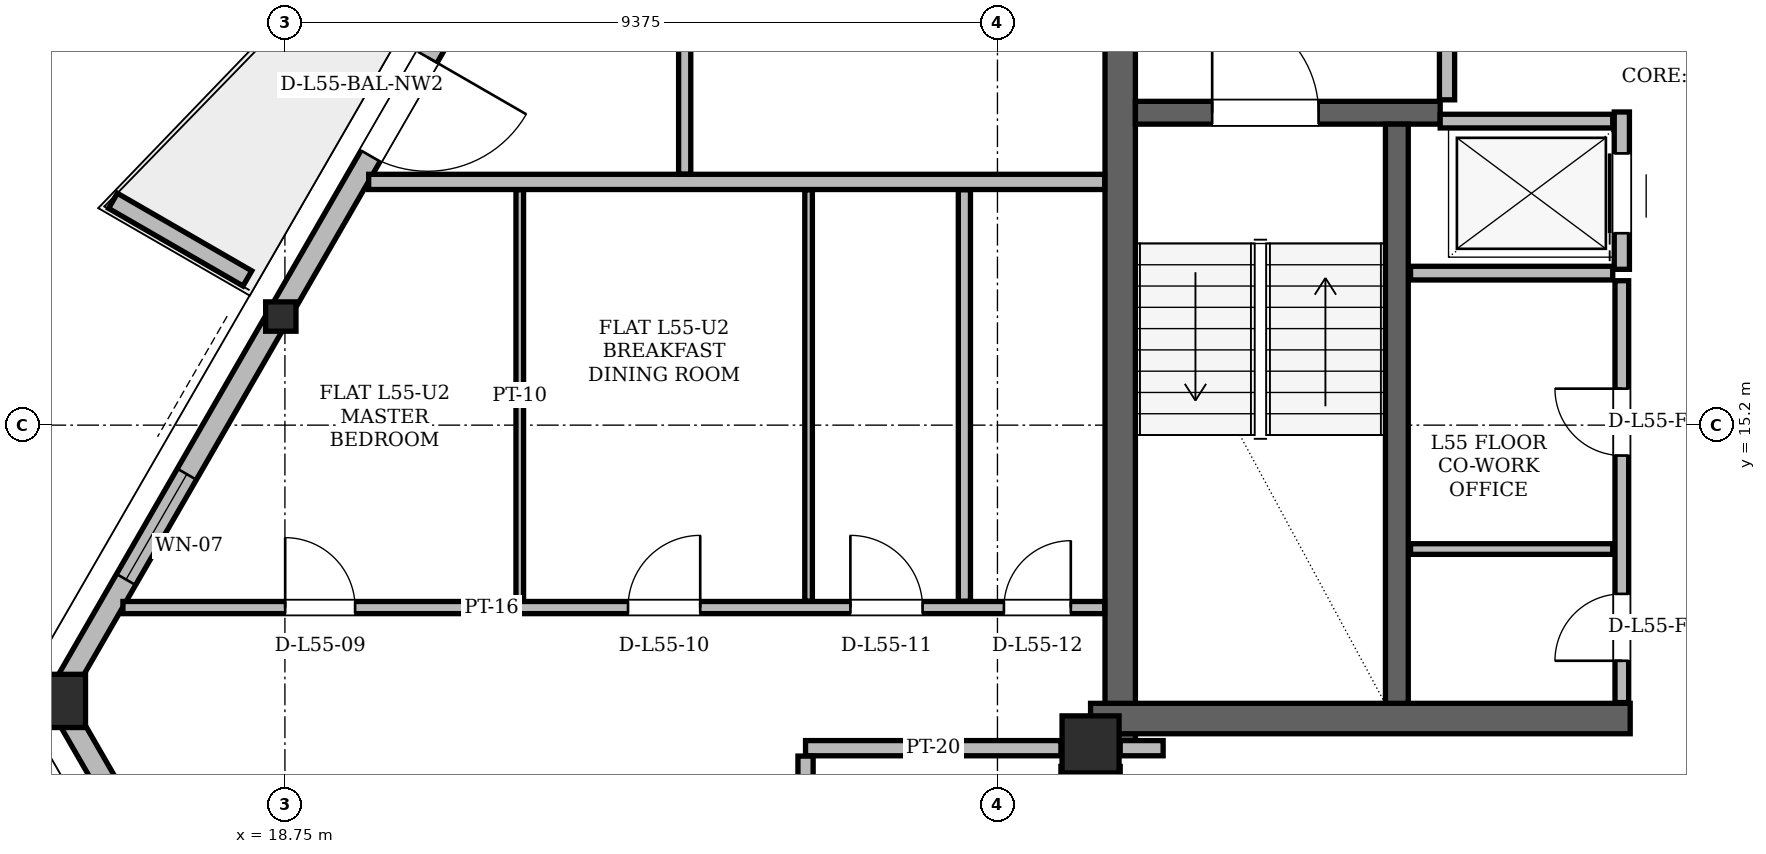
"""IFC4 building model, lengths in metres.
Left out: names, types, materials, properties, quantities, classifications, styles, units other than length and angle.
Written with IfcOpenShell. Run it as: python <this file> out.ifc"""

import sys

from ifc_helpers import new_model, si_unit, direction, frame, frame_2d, origin, origin_2d, place, context, subcontext, project, spatial, polyline, rectangle, hollow_rectangle, i_section, outline, extrude, element, fill, save


model = new_model("IFC4")
c1 = context("Model", 3, precision=1e-05, world=origin(), true_north=direction((0.0, 1.0)))
c2 = subcontext(c1, "Body", "Model", "MODEL_VIEW")
j1 = project(units=[si_unit("LENGTHUNIT", "METRE"), si_unit("PLANEANGLEUNIT", "RADIAN")], contexts=[c1])
p1 = place(None, origin())
s1 = spatial("IfcSite", under=j1, at=p1, CompositionType="ELEMENT")
p2 = place(p1, origin())
s2 = spatial("IfcBuilding", under=s1, at=p2, CompositionType="ELEMENT")
p3 = place(p2, frame((0.0, 0.0, 209.1)))
s3 = spatial("IfcBuildingStorey", under=s2, at=p3, CompositionType="ELEMENT", Elevation=209.1)
p4 = place(p3, frame((29.35, 11.0, 0.0), z_axis=(0.0, 0.0, 1.0), x_axis=(1.0, 0.0, 0.0)))
e1 = element("IfcColumn", 1, at=p4, inside=s3, PredefinedType="COLUMN", context=c2, shape_type="SweptSolid", body=[
    extrude(hollow_rectangle(XDim=0.75, YDim=0.75, WallThickness=0.06, at=origin_2d()), origin(), (0.0, 0.0, 1.0), 3.6),
])
p5 = place(p3, frame((15.754, 11.601, 0.004), z_axis=(0.012370810716, -0.016177214013, 0.999792608889), x_axis=(0.794357832977, 0.607450107571, 0.0)))
e2 = element("IfcColumn", 2, at=p5, inside=s3, PredefinedType="COLUMN", context=c2, shape_type="SweptSolid", body=[
    extrude(hollow_rectangle(XDim=0.7, YDim=0.7, WallThickness=0.055, at=origin_2d()), origin(), (0.0, 0.0, 1.0), 3.592),
])
p6 = place(p3, frame((18.672, 16.654, 0.004), z_axis=(0.01366248773, -0.014002350608, 0.99980861699), x_axis=(0.715739588462, 0.698367268354, 0.0)))
e3 = element("IfcColumn", 3, at=p6, inside=s3, PredefinedType="COLUMN", context=c2, shape_type="SweptSolid", body=[
    extrude(i_section(OverallWidth=0.399, OverallDepth=0.386, WebThickness=0.021, FlangeThickness=0.033, at=origin_2d()), origin(), (0.0, 0.0, 1.0), 3.592),
])
p7 = place(p3, frame((29.74, 11.0, 0.0), z_axis=(0.0, 0.0, 1.0), x_axis=(0.0, 1.0, 0.0)))
e4 = element("IfcWall", 4, at=p7, inside=s3, PredefinedType="SHEAR", context=c2, shape_type="SweptSolid", body=[
    extrude(rectangle(XDim=13.3, YDim=0.4, at=frame_2d((6.65, 0.0))), origin(), (0.0, 0.0, 1.0), 3.38),
])
p8 = place(p3, frame((29.35, 11.34, 0.0), z_axis=(0.0, 0.0, 1.0), x_axis=(1.0, 0.0, 0.0)))
e5 = element("IfcWall", 5, at=p8, inside=s3, PredefinedType="SHEAR", context=c2, shape_type="SweptSolid", body=[
    extrude(rectangle(XDim=7.1, YDim=0.4, at=frame_2d((3.55, 0.0))), origin(), (0.0, 0.0, 1.0), 3.38),
])
p9 = place(p3, frame((29.94, 19.31, 0.0), z_axis=(0.0, 0.0, 1.0), x_axis=(1.0, 0.0, 0.0)))
e6 = element("IfcWall", 6, at=p9, inside=s3, PredefinedType="SHEAR", context=c2, shape_type="SweptSolid", body=[
    extrude(rectangle(XDim=4.01, YDim=0.3, at=frame_2d((2.005, 0.0))), origin(), (0.0, 0.0, 1.0), 3.38),
])
p10 = place(p9, frame((1.01, 0.0, 0.0)))
e7 = element("IfcOpeningElement", 7, at=p10, cuts=e6, PredefinedType="OPENING", context=c2, shape_type="SweptSolid", body=[
    extrude(rectangle(XDim=1.4, YDim=2.2, at=frame_2d((0.7, 1.1))), frame((0.0, 0.15, 0.0), z_axis=(0.0, -1.0, 0.0), x_axis=(1.0, 0.0, 0.0)), (0.0, 0.0, 1.0), 0.3),
])
p11 = place(p3, frame((33.38, 11.54, 0.0), z_axis=(0.0, 0.0, 1.0), x_axis=(0.0, 1.0, 0.0)))
e8 = element("IfcWall", 8, at=p11, inside=s3, PredefinedType="SHEAR", context=c2, shape_type="SweptSolid", body=[
    extrude(rectangle(XDim=7.62, YDim=0.3, at=frame_2d((3.81, 0.0))), origin(), (0.0, 0.0, 1.0), 3.38),
])
p12 = place(p3, frame((15.754, 11.601, 0.0), z_axis=(0.0, 0.0, 1.0), x_axis=(0.500015274395, -0.866016584929, 0.0)))
e9 = element("IfcWall", 9, at=p12, inside=s3, PredefinedType="SOLIDWALL", context=c2, shape_type="SweptSolid", body=[
    extrude(rectangle(XDim=7.025, YDim=0.29, at=frame_2d((3.512, 0.0))), origin(), (0.0, 0.0, 1.0), 2.677),
])
p13 = place(p3, frame((33.988, 43.182, 0.0), z_axis=(0.0, 0.0, 1.0), x_axis=(-0.50000139879, -0.866024596191, 0.0)))
e10 = element("IfcWall", 10, at=p13, inside=s3, PredefinedType="SOLIDWALL", context=c2, shape_type="SweptSolid", body=[
    extrude(rectangle(XDim=36.467, YDim=0.29, at=frame_2d((18.233, 0.0))), origin(), (0.0, 0.0, 1.0), 2.677),
])
p14 = place(p13, frame((3.429, 0.0, 0.0)))
e11 = element("IfcOpeningElement", 11, at=p14, cuts=e10, PredefinedType="OPENING", context=c2, shape_type="SweptSolid", body=[
    extrude(rectangle(XDim=1.5, YDim=2.2, at=frame_2d((0.75, 1.1))), frame((0.0, 0.145, 0.0), z_axis=(0.0, -1.0, 0.0), x_axis=(1.0, 0.0, 0.0)), (0.0, 0.0, 1.0), 0.29),
])
p15 = place(p13, frame((26.722, 0.0, 0.0)))
e12 = element("IfcOpeningElement", 12, at=p15, cuts=e10, PredefinedType="OPENING", context=c2, shape_type="SweptSolid", body=[
    extrude(rectangle(XDim=1.5, YDim=2.2, at=frame_2d((0.75, 1.1))), frame((0.0, 0.145, 0.0), z_axis=(0.0, -1.0, 0.0), x_axis=(1.0, 0.0, 0.0)), (0.0, 0.0, 1.0), 0.29),
])
p16 = place(p13, frame((33.056, 0.0, 0.85)))
e13 = element("IfcOpeningElement", 13, at=p16, cuts=e10, PredefinedType="OPENING", context=c2, shape_type="SweptSolid", body=[
    extrude(rectangle(XDim=1.6, YDim=1.7, at=frame_2d((0.8, 0.85))), frame((0.0, 0.145, 0.0), z_axis=(0.0, -1.0, 0.0), x_axis=(1.0, 0.0, 0.0)), (0.0, 0.0, 1.0), 0.29),
])
p17 = place(p13, frame((22.736, 0.0, 0.85)))
e14 = element("IfcOpeningElement", 14, at=p17, cuts=e10, PredefinedType="OPENING", context=c2, shape_type="SweptSolid", body=[
    extrude(rectangle(XDim=1.2, YDim=1.48, at=frame_2d((0.6, 0.74))), frame((0.0, 0.145, 0.0), z_axis=(0.0, -1.0, 0.0), x_axis=(1.0, 0.0, 0.0)), (0.0, 0.0, 1.0), 0.29),
])
p18 = place(p3, frame((18.256, 17.13, 0.0), z_axis=(0.0, 0.0, 1.0), x_axis=(-0.866012356593, 0.500022597718, 0.0)))
e15 = element("IfcWall", 15, at=p18, inside=s3, PredefinedType="PARAPET", context=c2, shape_type="SweptSolid", body=[
    extrude(outline(polyline([(0.0, 0.0), (2.042, 0.0), (2.042, 1.1), (0.0, 1.32), (0.0, 0.0)])), frame((0.0, 0.115, 0.0), z_axis=(0.0, -1.0, 0.0), x_axis=(1.0, 0.0, 0.0)), (0.0, 0.0, 1.0), 0.23),
])
p19 = place(p3, frame((34.04, 19.48, 0.0), z_axis=(0.0, 0.0, 1.0), x_axis=(0.0, 1.0, 0.0)))
e16 = element("IfcWall", 16, at=p19, inside=s3, PredefinedType="PARTITIONING", context=c2, shape_type="SweptSolid", body=[
    extrude(rectangle(XDim=4.5, YDim=0.2, at=frame_2d((2.25, 0.0))), origin(), (0.0, 0.0, 1.0), 3.38),
])
p20 = place(p19, frame((2.12, 0.0, 0.0)))
e17 = element("IfcOpeningElement", 17, at=p20, cuts=e16, PredefinedType="OPENING", context=c2, shape_type="SweptSolid", body=[
    extrude(rectangle(XDim=1.1, YDim=2.2, at=frame_2d((0.55, 1.1))), frame((0.0, 0.1, 0.0), z_axis=(0.0, -1.0, 0.0), x_axis=(1.0, 0.0, 0.0)), (0.0, 0.0, 1.0), 0.2),
])
p21 = place(p3, frame((36.34, 17.25, 0.0), z_axis=(0.0, 0.0, 1.0), x_axis=(0.0, 1.0, 0.0)))
e18 = element("IfcWall", 18, at=p21, inside=s3, PredefinedType="PARTITIONING", context=c2, shape_type="SweptSolid", body=[
    extrude(rectangle(XDim=2.07, YDim=0.2, at=frame_2d((1.035, 0.0))), origin(), (0.0, 0.0, 1.0), 3.38),
])
p22 = place(p21, frame((0.475, 0.0, 0.0)))
e19 = element("IfcOpeningElement", 19, at=p22, cuts=e18, PredefinedType="OPENING", context=c2, shape_type="SweptSolid", body=[
    extrude(rectangle(XDim=1.05, YDim=2.15, at=frame_2d((0.525, 1.075))), frame((0.0, 0.1, 0.0), z_axis=(0.0, -1.0, 0.0), x_axis=(1.0, 0.0, 0.0)), (0.0, 0.0, 1.0), 0.2),
])
p23 = place(p3, frame((33.95, 19.2, 0.0), z_axis=(0.0, 0.0, 1.0), x_axis=(1.0, 0.0, 0.0)))
e20 = element("IfcWall", 20, at=p23, inside=s3, PredefinedType="PARTITIONING", context=c2, shape_type="SweptSolid", body=[
    extrude(rectangle(XDim=2.27, YDim=0.18, at=frame_2d((1.135, 0.0))), origin(), (0.0, 0.0, 1.0), 3.38),
])
p24 = place(p3, frame((33.56, 17.2, 0.0), z_axis=(0.0, 0.0, 1.0), x_axis=(1.0, 0.0, 0.0)))
e21 = element("IfcWall", 21, at=p24, inside=s3, PredefinedType="PARTITIONING", context=c2, shape_type="SweptSolid", body=[
    extrude(rectangle(XDim=2.66, YDim=0.18, at=frame_2d((1.33, 0.0))), origin(), (0.0, 0.0, 1.0), 3.38),
])
p25 = place(p3, frame((36.34, 11.55, 0.0), z_axis=(0.0, 0.0, 1.0), x_axis=(0.0, 1.0, 0.0)))
e22 = element("IfcWall", 22, at=p25, inside=s3, PredefinedType="PARTITIONING", context=c2, shape_type="SweptSolid", body=[
    extrude(rectangle(XDim=5.55, YDim=0.18, at=frame_2d((2.775, 0.0))), origin(), (0.0, 0.0, 1.0), 3.38),
])
p26 = place(p25, frame((0.55, 0.0, 0.0)))
e23 = element("IfcOpeningElement", 23, at=p26, cuts=e22, PredefinedType="OPENING", context=c2, shape_type="SweptSolid", body=[
    extrude(rectangle(XDim=0.88, YDim=2.08, at=frame_2d((0.44, 1.04))), frame((0.0, 0.09, 0.0), z_axis=(0.0, -1.0, 0.0), x_axis=(1.0, 0.0, 0.0)), (0.0, 0.0, 1.0), 0.18),
])
p27 = place(p25, frame((3.25, 0.0, 0.0)))
e24 = element("IfcOpeningElement", 24, at=p27, cuts=e22, PredefinedType="OPENING", context=c2, shape_type="SweptSolid", body=[
    extrude(rectangle(XDim=0.88, YDim=2.08, at=frame_2d((0.44, 1.04))), frame((0.0, 0.09, 0.0), z_axis=(0.0, -1.0, 0.0), x_axis=(1.0, 0.0, 0.0)), (0.0, 0.0, 1.0), 0.18),
])
p28 = place(p3, frame((33.56, 13.57, 0.0), z_axis=(0.0, 0.0, 1.0), x_axis=(1.0, 0.0, 0.0)))
e25 = element("IfcWall", 25, at=p28, inside=s3, PredefinedType="PARTITIONING", context=c2, shape_type="SweptSolid", body=[
    extrude(rectangle(XDim=2.66, YDim=0.14, at=frame_2d((1.33, 0.0))), origin(), (0.0, 0.0, 1.0), 3.38),
])
p29 = place(p3, frame((28.96, 10.61, 0.0), z_axis=(0.0, 0.0, 1.0), x_axis=(1.0, 0.0, 0.0)))
e26 = element("IfcWall", 26, at=p29, inside=s3, PredefinedType="PARTITIONING", context=c2, shape_type="SweptSolid", body=[
    extrude(rectangle(XDim=0.78, YDim=0.2, at=frame_2d((0.39, 0.0))), origin(), (0.0, 0.0, 1.0), 3.38),
])
p30 = place(p3, frame((25.6, 10.95, 0.0), z_axis=(0.0, 0.0, 1.0), x_axis=(1.0, 0.0, 0.0)))
e27 = element("IfcWall", 27, at=p30, inside=s3, PredefinedType="PARTITIONING", context=c2, shape_type="SweptSolid", body=[
    extrude(rectangle(XDim=3.36, YDim=0.2, at=frame_2d((1.68, 0.0))), origin(), (0.0, 0.0, 1.0), 2.913),
])
p31 = place(p3, frame((29.74, 10.95, 0.0), z_axis=(0.0, 0.0, 1.0), x_axis=(1.0, 0.0, 0.0)))
e28 = element("IfcWall", 28, at=p31, inside=s3, PredefinedType="PARTITIONING", context=c2, shape_type="SweptSolid", body=[
    extrude(rectangle(XDim=0.565, YDim=0.2, at=frame_2d((0.282, 0.0))), origin(), (0.0, 0.0, 1.0), 2.52),
])
p32 = place(p3, frame((16.619, 12.8, 0.0), z_axis=(0.0, 0.0, 1.0), x_axis=(1.0, 0.0, 0.0)))
e29 = element("IfcWall", 29, at=p32, inside=s3, PredefinedType="PARTITIONING", context=c2, shape_type="SweptSolid", body=[
    extrude(rectangle(XDim=12.917, YDim=0.16, at=frame_2d((6.458, 0.0))), origin(), (0.0, 0.0, 1.0), 2.52),
])
p33 = place(p32, frame((2.135, 0.0, 0.0)))
e30 = element("IfcOpeningElement", 30, at=p33, cuts=e29, PredefinedType="OPENING", context=c2, shape_type="SweptSolid", body=[
    extrude(rectangle(XDim=0.92, YDim=2.12, at=frame_2d((0.46, 1.06))), frame((0.0, 0.08, 0.0), z_axis=(0.0, -1.0, 0.0), x_axis=(1.0, 0.0, 0.0)), (0.0, 0.0, 1.0), 0.16),
])
p34 = place(p32, frame((6.646, 0.0, 0.0)))
e31 = element("IfcOpeningElement", 31, at=p34, cuts=e29, PredefinedType="OPENING", context=c2, shape_type="SweptSolid", body=[
    extrude(rectangle(XDim=0.95, YDim=2.1, at=frame_2d((0.475, 1.05))), frame((0.0, 0.08, 0.0), z_axis=(0.0, -1.0, 0.0), x_axis=(1.0, 0.0, 0.0)), (0.0, 0.0, 1.0), 0.16),
])
p35 = place(p32, frame((9.571, 0.0, 0.0)))
e32 = element("IfcOpeningElement", 32, at=p35, cuts=e29, PredefinedType="OPENING", context=c2, shape_type="SweptSolid", body=[
    extrude(rectangle(XDim=0.95, YDim=2.1, at=frame_2d((0.475, 1.05))), frame((0.0, 0.08, 0.0), z_axis=(0.0, -1.0, 0.0), x_axis=(1.0, 0.0, 0.0)), (0.0, 0.0, 1.0), 0.16),
])
p36 = place(p32, frame((11.591, 0.0, 0.0)))
e33 = element("IfcOpeningElement", 33, at=p36, cuts=e29, PredefinedType="OPENING", context=c2, shape_type="SweptSolid", body=[
    extrude(rectangle(XDim=0.88, YDim=2.08, at=frame_2d((0.44, 1.04))), frame((0.0, 0.08, 0.0), z_axis=(0.0, -1.0, 0.0), x_axis=(1.0, 0.0, 0.0)), (0.0, 0.0, 1.0), 0.16),
])
p37 = place(p3, frame((19.852, 18.4, 0.0), z_axis=(0.0, 0.0, 1.0), x_axis=(1.0, 0.0, 0.0)))
e34 = element("IfcWall", 34, at=p37, inside=s3, PredefinedType="PARTITIONING", context=c2, shape_type="SweptSolid", body=[
    extrude(rectangle(XDim=9.684, YDim=0.2, at=frame_2d((4.842, 0.0))), origin(), (0.0, 0.0, 1.0), 2.52),
])
p38 = place(p3, frame((21.84, 12.884, 0.0), z_axis=(0.0, 0.0, 1.0), x_axis=(0.0, 1.0, 0.0)))
e35 = element("IfcWall", 35, at=p38, inside=s3, PredefinedType="PARTITIONING", context=c2, shape_type="SweptSolid", body=[
    extrude(rectangle(XDim=5.412, YDim=0.1, at=frame_2d((2.706, 0.0))), origin(), (0.0, 0.0, 1.0), 3.38),
])
p39 = place(p3, frame((24.01, 18.504, 0.0), z_axis=(0.0, 0.0, 1.0), x_axis=(0.0, 1.0, 0.0)))
e36 = element("IfcWall", 36, at=p39, inside=s3, PredefinedType="PARTITIONING", context=c2, shape_type="SweptSolid", body=[
    extrude(rectangle(XDim=5.712, YDim=0.16, at=frame_2d((2.856, 0.0))), origin(), (0.0, 0.0, 1.0), 3.38),
])
p40 = place(p39, frame((2.416, 0.0, 0.0)))
e37 = element("IfcOpeningElement", 37, at=p40, cuts=e36, PredefinedType="OPENING", context=c2, shape_type="SweptSolid", body=[
    extrude(rectangle(XDim=0.88, YDim=2.08, at=frame_2d((0.44, 1.04))), frame((0.0, 0.08, 0.0), z_axis=(0.0, -1.0, 0.0), x_axis=(1.0, 0.0, 0.0)), (0.0, 0.0, 1.0), 0.16),
])
p41 = place(p3, frame((25.6, 9.404, 0.0), z_axis=(0.0, 0.0, 1.0), x_axis=(0.0, 1.0, 0.0)))
e38 = element("IfcWall", 38, at=p41, inside=s3, PredefinedType="PARTITIONING", context=c2, shape_type="SweptSolid", body=[
    extrude(rectangle(XDim=1.442, YDim=0.2, at=frame_2d((0.721, 0.0))), origin(), (0.0, 0.0, 1.0), 3.38),
])
p42 = place(p3, frame((25.64, 12.884, 0.0), z_axis=(0.0, 0.0, 1.0), x_axis=(0.0, 1.0, 0.0)))
e39 = element("IfcWall", 39, at=p42, inside=s3, PredefinedType="PARTITIONING", context=c2, shape_type="SweptSolid", body=[
    extrude(rectangle(XDim=5.412, YDim=0.1, at=frame_2d((2.706, 0.0))), origin(), (0.0, 0.0, 1.0), 3.38),
])
p43 = place(p3, frame((27.69, 12.884, 0.0), z_axis=(0.0, 0.0, 1.0), x_axis=(0.0, 1.0, 0.0)))
e40 = element("IfcWall", 40, at=p43, inside=s3, PredefinedType="PARTITIONING", context=c2, shape_type="SweptSolid", body=[
    extrude(rectangle(XDim=5.412, YDim=0.16, at=frame_2d((2.706, 0.0))), origin(), (0.0, 0.0, 1.0), 3.38),
])
p44 = place(p15, origin())
e41 = element("IfcDoor", 41, at=p44, inside=s3, OperationType="SINGLE_SWING_LEFT", PredefinedType="DOOR", context=c2, shape_type="SweptSolid", body=[
    extrude(rectangle(XDim=1.5, YDim=2.2, at=frame_2d((0.75, 1.1))), frame((0.0, 0.025, 0.0), z_axis=(0.0, -1.0, 0.0), x_axis=(1.0, 0.0, 0.0)), (0.0, 0.0, 1.0), 0.05),
])
fill(e12, e41)
p45 = place(p16, origin())
e42 = element("IfcWindow", 42, at=p45, inside=s3, PartitioningType="SINGLE_PANEL", PredefinedType="WINDOW", context=c2, shape_type="SweptSolid", body=[
    extrude(rectangle(XDim=1.6, YDim=1.7, at=frame_2d((0.8, 0.85))), frame((0.0, 0.03, 0.0), z_axis=(0.0, -1.0, 0.0), x_axis=(1.0, 0.0, 0.0)), (0.0, 0.0, 1.0), 0.06),
])
fill(e13, e42)
p46 = place(p26, origin())
e43 = element("IfcDoor", 43, at=p46, inside=s3, OperationType="SINGLE_SWING_LEFT", PredefinedType="DOOR", context=c2, shape_type="SweptSolid", body=[
    extrude(rectangle(XDim=0.88, YDim=2.08, at=frame_2d((0.44, 1.04))), frame((0.0, 0.025, 0.0), z_axis=(0.0, -1.0, 0.0), x_axis=(1.0, 0.0, 0.0)), (0.0, 0.0, 1.0), 0.05),
])
fill(e23, e43)
p47 = place(p27, origin())
e44 = element("IfcDoor", 44, at=p47, inside=s3, OperationType="SINGLE_SWING_RIGHT", PredefinedType="DOOR", context=c2, shape_type="SweptSolid", body=[
    extrude(rectangle(XDim=0.88, YDim=2.08, at=frame_2d((0.44, 1.04))), frame((0.0, 0.025, 0.0), z_axis=(0.0, -1.0, 0.0), x_axis=(1.0, 0.0, 0.0)), (0.0, 0.0, 1.0), 0.05),
])
fill(e24, e44)
p48 = place(p22, origin())
e45 = element("IfcDoor", 45, at=p48, inside=s3, OperationType="SLIDING_TO_LEFT", PredefinedType="DOOR", context=c2, shape_type="SweptSolid", body=[
    extrude(rectangle(XDim=1.05, YDim=2.15, at=frame_2d((0.525, 1.075))), frame((0.0, 0.025, 0.0), z_axis=(0.0, -1.0, 0.0), x_axis=(1.0, 0.0, 0.0)), (0.0, 0.0, 1.0), 0.05),
])
fill(e19, e45)
p49 = place(p10, origin())
e46 = element("IfcDoor", 46, at=p49, inside=s3, OperationType="SINGLE_SWING_LEFT", PredefinedType="DOOR", context=c2, shape_type="SweptSolid", body=[
    extrude(rectangle(XDim=1.4, YDim=2.2, at=frame_2d((0.7, 1.1))), frame((0.0, 0.025, 0.0), z_axis=(0.0, -1.0, 0.0), x_axis=(1.0, 0.0, 0.0)), (0.0, 0.0, 1.0), 0.05),
])
fill(e7, e46)
p50 = place(p33, origin())
e47 = element("IfcDoor", 47, at=p50, inside=s3, OperationType="SINGLE_SWING_LEFT", PredefinedType="DOOR", context=c2, shape_type="SweptSolid", body=[
    extrude(rectangle(XDim=0.92, YDim=2.12, at=frame_2d((0.46, 1.06))), frame((0.0, 0.025, 0.0), z_axis=(0.0, -1.0, 0.0), x_axis=(1.0, 0.0, 0.0)), (0.0, 0.0, 1.0), 0.05),
])
fill(e30, e47)
p51 = place(p34, origin())
e48 = element("IfcDoor", 48, at=p51, inside=s3, OperationType="SINGLE_SWING_RIGHT", PredefinedType="DOOR", context=c2, shape_type="SweptSolid", body=[
    extrude(rectangle(XDim=0.95, YDim=2.1, at=frame_2d((0.475, 1.05))), frame((0.0, 0.025, 0.0), z_axis=(0.0, -1.0, 0.0), x_axis=(1.0, 0.0, 0.0)), (0.0, 0.0, 1.0), 0.05),
])
fill(e31, e48)
p52 = place(p35, origin())
e49 = element("IfcDoor", 49, at=p52, inside=s3, OperationType="SINGLE_SWING_LEFT", PredefinedType="DOOR", context=c2, shape_type="SweptSolid", body=[
    extrude(rectangle(XDim=0.95, YDim=2.1, at=frame_2d((0.475, 1.05))), frame((0.0, 0.025, 0.0), z_axis=(0.0, -1.0, 0.0), x_axis=(1.0, 0.0, 0.0)), (0.0, 0.0, 1.0), 0.05),
])
fill(e32, e49)
p53 = place(p36, origin())
e50 = element("IfcDoor", 50, at=p53, inside=s3, OperationType="SINGLE_SWING_RIGHT", PredefinedType="DOOR", context=c2, shape_type="SweptSolid", body=[
    extrude(rectangle(XDim=0.88, YDim=2.08, at=frame_2d((0.44, 1.04))), frame((0.0, 0.025, 0.0), z_axis=(0.0, -1.0, 0.0), x_axis=(1.0, 0.0, 0.0)), (0.0, 0.0, 1.0), 0.05),
])
fill(e33, e50)
save(model, sys.argv[1])
